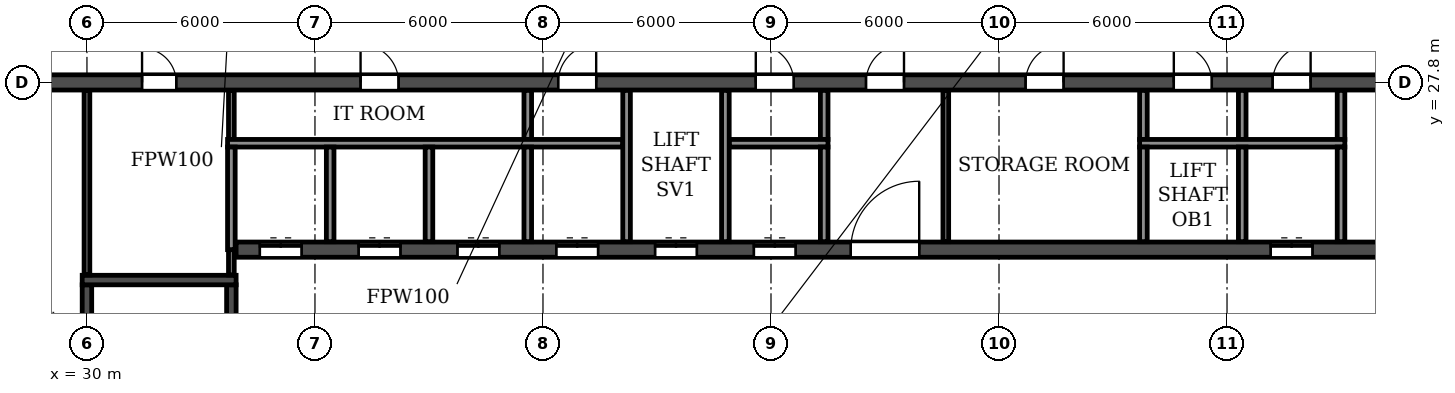
"""IFC4 building model, lengths in metres.
Left out: names, types, materials, properties, quantities, classifications, styles, units other than length and angle.
Written with IfcOpenShell. Run it as: python <this file> out.ifc"""

import sys

from ifc_helpers import new_model, si_unit, direction, frame, frame_2d, origin, place, context, subcontext, project, spatial, rectangle, extrude, element, fill, save


model = new_model("IFC4")
c1 = context("Model", 3, precision=1e-05, world=origin(), true_north=direction((0.0, 1.0)))
c2 = subcontext(c1, "Body", "Model", "MODEL_VIEW")
j1 = project(units=[si_unit("LENGTHUNIT", "METRE"), si_unit("PLANEANGLEUNIT", "RADIAN")], contexts=[c1])
p1 = place(None, origin())
s1 = spatial("IfcSite", under=j1, at=p1, CompositionType="ELEMENT")
p2 = place(p1, origin())
s2 = spatial("IfcBuilding", under=s1, at=p2, CompositionType="ELEMENT")
p3 = place(p2, frame((0.0, 0.0, 181.8)))
s3 = spatial("IfcBuildingStorey", under=s2, at=p3, CompositionType="ELEMENT", Elevation=181.8)
p4 = place(p3, frame((18.2, 27.8, 0.0), z_axis=(0.0, 0.0, 1.0), x_axis=(1.0, 0.0, 0.0)))
e1 = element("IfcWall", 1, at=p4, inside=s3, PredefinedType="SOLIDWALL", context=c2, shape_type="SweptSolid", body=[
    extrude(rectangle(XDim=65.6, YDim=0.4, at=frame_2d((32.8, 0.0))), origin(), (0.0, 0.0, 1.0), 3.08),
])
p5 = place(p4, frame((0.7, 0.0, 0.0)))
e2 = element("IfcOpeningElement", 2, at=p5, cuts=e1, PredefinedType="OPENING", context=c2, shape_type="SweptSolid", body=[
    extrude(rectangle(XDim=1.0, YDim=2.1, at=frame_2d((0.5, 1.05))), frame((0.0, 0.21, 0.0), z_axis=(0.0, -1.0, 0.0), x_axis=(1.0, 0.0, 0.0)), (0.0, 0.0, 1.0), 0.42),
])
p6 = place(p4, frame((4.05, 0.0, 0.0)))
e3 = element("IfcOpeningElement", 3, at=p6, cuts=e1, PredefinedType="OPENING", context=c2, shape_type="SweptSolid", body=[
    extrude(rectangle(XDim=0.9, YDim=2.1, at=frame_2d((0.45, 1.05))), frame((0.0, 0.21, 0.0), z_axis=(0.0, -1.0, 0.0), x_axis=(1.0, 0.0, 0.0)), (0.0, 0.0, 1.0), 0.42),
])
p7 = place(p4, frame((13.25, 0.0, 0.0)))
e4 = element("IfcOpeningElement", 4, at=p7, cuts=e1, PredefinedType="OPENING", context=c2, shape_type="SweptSolid", body=[
    extrude(rectangle(XDim=0.9, YDim=2.1, at=frame_2d((0.45, 1.05))), frame((0.0, 0.21, 0.0), z_axis=(0.0, -1.0, 0.0), x_axis=(1.0, 0.0, 0.0)), (0.0, 0.0, 1.0), 0.42),
])
p8 = place(p4, frame((19.0, 0.0, 0.0)))
e5 = element("IfcOpeningElement", 5, at=p8, cuts=e1, PredefinedType="OPENING", context=c2, shape_type="SweptSolid", body=[
    extrude(rectangle(XDim=1.0, YDim=2.1, at=frame_2d((0.5, 1.05))), frame((0.0, 0.21, 0.0), z_axis=(0.0, -1.0, 0.0), x_axis=(1.0, 0.0, 0.0)), (0.0, 0.0, 1.0), 0.42),
])
p9 = place(p4, frame((24.2, 0.0, 0.0)))
e6 = element("IfcOpeningElement", 6, at=p9, cuts=e1, PredefinedType="OPENING", context=c2, shape_type="SweptSolid", body=[
    extrude(rectangle(XDim=1.0, YDim=2.1, at=frame_2d((0.5, 1.05))), frame((0.0, 0.21, 0.0), z_axis=(0.0, -1.0, 0.0), x_axis=(1.0, 0.0, 0.0)), (0.0, 0.0, 1.0), 0.42),
])
p10 = place(p4, frame((29.4, 0.0, 0.0)))
e7 = element("IfcOpeningElement", 7, at=p10, cuts=e1, PredefinedType="OPENING", context=c2, shape_type="SweptSolid", body=[
    extrude(rectangle(XDim=1.0, YDim=2.1, at=frame_2d((0.5, 1.05))), frame((0.0, 0.21, 0.0), z_axis=(0.0, -1.0, 0.0), x_axis=(1.0, 0.0, 0.0)), (0.0, 0.0, 1.0), 0.42),
])
p11 = place(p4, frame((32.3, 0.0, 0.0)))
e8 = element("IfcOpeningElement", 8, at=p11, cuts=e1, PredefinedType="OPENING", context=c2, shape_type="SweptSolid", body=[
    extrude(rectangle(XDim=1.0, YDim=2.1, at=frame_2d((0.5, 1.05))), frame((0.0, 0.21, 0.0), z_axis=(0.0, -1.0, 0.0), x_axis=(1.0, 0.0, 0.0)), (0.0, 0.0, 1.0), 0.42),
])
p12 = place(p4, frame((36.5, 0.0, 0.0)))
e9 = element("IfcOpeningElement", 9, at=p12, cuts=e1, PredefinedType="OPENING", context=c2, shape_type="SweptSolid", body=[
    extrude(rectangle(XDim=1.0, YDim=2.1, at=frame_2d((0.5, 1.05))), frame((0.0, 0.21, 0.0), z_axis=(0.0, -1.0, 0.0), x_axis=(1.0, 0.0, 0.0)), (0.0, 0.0, 1.0), 0.42),
])
p13 = place(p4, frame((40.4, 0.0, 0.0)))
e10 = element("IfcOpeningElement", 10, at=p13, cuts=e1, PredefinedType="OPENING", context=c2, shape_type="SweptSolid", body=[
    extrude(rectangle(XDim=1.0, YDim=2.1, at=frame_2d((0.5, 1.05))), frame((0.0, 0.21, 0.0), z_axis=(0.0, -1.0, 0.0), x_axis=(1.0, 0.0, 0.0)), (0.0, 0.0, 1.0), 0.42),
])
p14 = place(p4, frame((43.0, 0.0, 0.0)))
e11 = element("IfcOpeningElement", 11, at=p14, cuts=e1, PredefinedType="OPENING", context=c2, shape_type="SweptSolid", body=[
    extrude(rectangle(XDim=1.0, YDim=2.1, at=frame_2d((0.5, 1.05))), frame((0.0, 0.21, 0.0), z_axis=(0.0, -1.0, 0.0), x_axis=(1.0, 0.0, 0.0)), (0.0, 0.0, 1.0), 0.42),
])
p15 = place(p4, frame((46.65, 0.0, 0.0)))
e12 = element("IfcOpeningElement", 12, at=p15, cuts=e1, PredefinedType="OPENING", context=c2, shape_type="SweptSolid", body=[
    extrude(rectangle(XDim=1.5, YDim=2.1, at=frame_2d((0.75, 1.05))), frame((0.0, 0.21, 0.0), z_axis=(0.0, -1.0, 0.0), x_axis=(1.0, 0.0, 0.0)), (0.0, 0.0, 1.0), 0.42),
])
p16 = place(p4, frame((51.45, 0.0, 0.0)))
e13 = element("IfcOpeningElement", 13, at=p16, cuts=e1, PredefinedType="OPENING", context=c2, shape_type="SweptSolid", body=[
    extrude(rectangle(XDim=0.9, YDim=2.1, at=frame_2d((0.45, 1.05))), frame((0.0, 0.21, 0.0), z_axis=(0.0, -1.0, 0.0), x_axis=(1.0, 0.0, 0.0)), (0.0, 0.0, 1.0), 0.42),
])
p17 = place(p4, frame((60.65, 0.0, 0.0)))
e14 = element("IfcOpeningElement", 14, at=p17, cuts=e1, PredefinedType="OPENING", context=c2, shape_type="SweptSolid", body=[
    extrude(rectangle(XDim=0.9, YDim=2.1, at=frame_2d((0.45, 1.05))), frame((0.0, 0.21, 0.0), z_axis=(0.0, -1.0, 0.0), x_axis=(1.0, 0.0, 0.0)), (0.0, 0.0, 1.0), 0.42),
])
p18 = place(p4, frame((63.9, 0.0, 0.0)))
e15 = element("IfcOpeningElement", 15, at=p18, cuts=e1, PredefinedType="OPENING", context=c2, shape_type="SweptSolid", body=[
    extrude(rectangle(XDim=1.0, YDim=2.1, at=frame_2d((0.5, 1.05))), frame((0.0, 0.21, 0.0), z_axis=(0.0, -1.0, 0.0), x_axis=(1.0, 0.0, 0.0)), (0.0, 0.0, 1.0), 0.42),
])
p19 = place(p3, frame((33.925, 23.4, 0.0), z_axis=(0.0, 0.0, 1.0), x_axis=(1.0, 0.0, 0.0)))
e16 = element("IfcWall", 16, at=p19, inside=s3, PredefinedType="SOLIDWALL", context=c2, shape_type="SweptSolid", body=[
    extrude(rectangle(XDim=34.15, YDim=0.4, at=frame_2d((17.075, 0.0))), origin(), (0.0, 0.0, 1.0), 3.08),
])
p20 = place(p19, frame((16.175, 0.0, 0.0)))
e17 = element("IfcOpeningElement", 17, at=p20, cuts=e16, PredefinedType="OPENING", context=c2, shape_type="SweptSolid", body=[
    extrude(rectangle(XDim=1.8, YDim=2.1, at=frame_2d((0.9, 1.05))), frame((0.0, 0.21, 0.0), z_axis=(0.0, -1.0, 0.0), x_axis=(1.0, 0.0, 0.0)), (0.0, 0.0, 1.0), 0.42),
])
p21 = place(p19, frame((0.625, 0.0, 0.0)))
e18 = element("IfcOpeningElement", 18, at=p21, cuts=e16, PredefinedType="OPENING", context=c2, shape_type="SweptSolid", body=[
    extrude(rectangle(XDim=1.1, YDim=2.1, at=frame_2d((0.55, 1.05))), frame((0.0, 0.21, 0.0), z_axis=(0.0, -1.0, 0.0), x_axis=(1.0, 0.0, 0.0)), (0.0, 0.0, 1.0), 0.42),
])
p22 = place(p19, frame((3.225, 0.0, 0.0)))
e19 = element("IfcOpeningElement", 19, at=p22, cuts=e16, PredefinedType="OPENING", context=c2, shape_type="SweptSolid", body=[
    extrude(rectangle(XDim=1.1, YDim=2.1, at=frame_2d((0.55, 1.05))), frame((0.0, 0.21, 0.0), z_axis=(0.0, -1.0, 0.0), x_axis=(1.0, 0.0, 0.0)), (0.0, 0.0, 1.0), 0.42),
])
p23 = place(p19, frame((5.825, 0.0, 0.0)))
e20 = element("IfcOpeningElement", 20, at=p23, cuts=e16, PredefinedType="OPENING", context=c2, shape_type="SweptSolid", body=[
    extrude(rectangle(XDim=1.1, YDim=2.1, at=frame_2d((0.55, 1.05))), frame((0.0, 0.21, 0.0), z_axis=(0.0, -1.0, 0.0), x_axis=(1.0, 0.0, 0.0)), (0.0, 0.0, 1.0), 0.42),
])
p24 = place(p19, frame((8.425, 0.0, 0.0)))
e21 = element("IfcOpeningElement", 21, at=p24, cuts=e16, PredefinedType="OPENING", context=c2, shape_type="SweptSolid", body=[
    extrude(rectangle(XDim=1.1, YDim=2.1, at=frame_2d((0.55, 1.05))), frame((0.0, 0.21, 0.0), z_axis=(0.0, -1.0, 0.0), x_axis=(1.0, 0.0, 0.0)), (0.0, 0.0, 1.0), 0.42),
])
p25 = place(p19, frame((11.025, 0.0, 0.0)))
e22 = element("IfcOpeningElement", 22, at=p25, cuts=e16, PredefinedType="OPENING", context=c2, shape_type="SweptSolid", body=[
    extrude(rectangle(XDim=1.1, YDim=2.1, at=frame_2d((0.55, 1.05))), frame((0.0, 0.21, 0.0), z_axis=(0.0, -1.0, 0.0), x_axis=(1.0, 0.0, 0.0)), (0.0, 0.0, 1.0), 0.42),
])
p26 = place(p19, frame((13.625, 0.0, 0.0)))
e23 = element("IfcOpeningElement", 23, at=p26, cuts=e16, PredefinedType="OPENING", context=c2, shape_type="SweptSolid", body=[
    extrude(rectangle(XDim=1.1, YDim=2.1, at=frame_2d((0.55, 1.05))), frame((0.0, 0.21, 0.0), z_axis=(0.0, -1.0, 0.0), x_axis=(1.0, 0.0, 0.0)), (0.0, 0.0, 1.0), 0.42),
])
p27 = place(p19, frame((27.225, 0.0, 0.0)))
e24 = element("IfcOpeningElement", 24, at=p27, cuts=e16, PredefinedType="OPENING", context=c2, shape_type="SweptSolid", body=[
    extrude(rectangle(XDim=1.1, YDim=2.1, at=frame_2d((0.55, 1.05))), frame((0.0, 0.21, 0.0), z_axis=(0.0, -1.0, 0.0), x_axis=(1.0, 0.0, 0.0)), (0.0, 0.0, 1.0), 0.42),
])
p28 = place(p3, frame((30.0, 14.8, 0.0), z_axis=(0.0, 0.0, 1.0), x_axis=(0.0, 1.0, 0.0)))
e25 = element("IfcWall", 25, at=p28, inside=s3, PredefinedType="SOLIDWALL", context=c2, shape_type="SweptSolid", body=[
    extrude(rectangle(XDim=7.675, YDim=0.25, at=frame_2d((3.837, 0.0))), origin(), (0.0, 0.0, 1.0), 3.08),
])
p29 = place(p3, frame((33.8, 14.8, 0.0), z_axis=(0.0, 0.0, 1.0), x_axis=(0.0, 1.0, 0.0)))
e26 = element("IfcWall", 26, at=p29, inside=s3, PredefinedType="SOLIDWALL", context=c2, shape_type="SweptSolid", body=[
    extrude(rectangle(XDim=7.675, YDim=0.25, at=frame_2d((3.837, 0.0))), origin(), (0.0, 0.0, 1.0), 3.08),
])
p30 = place(p29, frame((0.5, 0.0, 0.0)))
e27 = element("IfcOpeningElement", 27, at=p30, cuts=e26, PredefinedType="OPENING", context=c2, shape_type="SweptSolid", body=[
    extrude(rectangle(XDim=1.0, YDim=2.1, at=frame_2d((0.5, 1.05))), frame((0.0, 0.135, 0.0), z_axis=(0.0, -1.0, 0.0), x_axis=(1.0, 0.0, 0.0)), (0.0, 0.0, 1.0), 0.27),
])
p31 = place(p3, frame((29.875, 22.6, 0.0), z_axis=(0.0, 0.0, 1.0), x_axis=(1.0, 0.0, 0.0)))
e28 = element("IfcWall", 28, at=p31, inside=s3, PredefinedType="SOLIDWALL", context=c2, shape_type="SweptSolid", body=[
    extrude(rectangle(XDim=4.05, YDim=0.25, at=frame_2d((2.025, 0.0))), origin(), (0.0, 0.0, 1.0), 3.08),
])
p32 = place(p3, frame((52.6, 23.61, 0.0), z_axis=(0.0, 0.0, 1.0), x_axis=(0.0, 1.0, 0.0)))
e29 = element("IfcWall", 29, at=p32, inside=s3, PredefinedType="PARTITIONING", context=c2, shape_type="SweptSolid", body=[
    extrude(rectangle(XDim=3.98, YDim=0.15, at=frame_2d((1.99, 0.0))), origin(), (0.0, 0.0, 1.0), 3.08),
])
for number, where, z_axis, x_axis in (
    (30, (41.6, 26.3, 0.0), (0.0, 0.0, 1.0), (0.0, 1.0, 0.0)),
    (31, (49.4, 26.3, 0.0), (0.0, 0.0, 1.0), (0.0, 1.0, 0.0)),
    (32, (57.8, 26.3, 0.0), (0.0, 0.0, 1.0), (0.0, 1.0, 0.0)),
    (33, (60.4, 26.3, 0.0), (0.0, 0.0, 1.0), (0.0, 1.0, 0.0)),
    (34, (63.0, 26.3, 0.0), (0.0, 0.0, 1.0), (0.0, 1.0, 0.0)),
):
    element("IfcWall", number, at=place(p3, frame(where, z_axis=z_axis, x_axis=x_axis)), inside=s3, PredefinedType="PARTITIONING", context=c2, shape_type="SweptSolid", body=[
        extrude(rectangle(XDim=1.29, YDim=0.2, at=frame_2d((0.645, 0.0))), origin(), (0.0, 0.0, 1.0), 3.08),
    ])
p33 = place(p3, frame((30.0, 22.735, 0.0), z_axis=(0.0, 0.0, 1.0), x_axis=(0.0, 1.0, 0.0)))
e35 = element("IfcWall", 35, at=p33, inside=s3, PredefinedType="PARTITIONING", context=c2, shape_type="SweptSolid", body=[
    extrude(rectangle(XDim=4.855, YDim=0.15, at=frame_2d((2.427, 0.0))), origin(), (0.0, 0.0, 1.0), 3.08),
])
p34 = place(p3, frame((33.8, 22.735, 0.0), z_axis=(0.0, 0.0, 1.0), x_axis=(0.0, 1.0, 0.0)))
e36 = element("IfcWall", 36, at=p34, inside=s3, PredefinedType="PARTITIONING", context=c2, shape_type="SweptSolid", body=[
    extrude(rectangle(XDim=0.665, YDim=0.15, at=frame_2d((0.333, 0.0))), origin(), (0.0, 0.0, 1.0), 3.08),
])
p35 = place(p3, frame((33.8, 26.3, 0.0), z_axis=(0.0, 0.0, 1.0), x_axis=(0.0, 1.0, 0.0)))
e37 = element("IfcWall", 37, at=p35, inside=s3, PredefinedType="PARTITIONING", context=c2, shape_type="SweptSolid", body=[
    extrude(rectangle(XDim=1.29, YDim=0.15, at=frame_2d((0.645, 0.0))), origin(), (0.0, 0.0, 1.0), 3.08),
])
p36 = place(p3, frame((33.7, 26.2, 0.0), z_axis=(0.0, 0.0, 1.0), x_axis=(1.0, 0.0, 0.0)))
e38 = element("IfcWall", 38, at=p36, inside=s3, PredefinedType="PARTITIONING", context=c2, shape_type="SweptSolid", body=[
    extrude(rectangle(XDim=10.4, YDim=0.2, at=frame_2d((5.2, 0.0))), origin(), (0.0, 0.0, 1.0), 3.08),
])
p37 = place(p3, frame((46.9, 26.2, 0.0), z_axis=(0.0, 0.0, 1.0), x_axis=(1.0, 0.0, 0.0)))
e39 = element("IfcWall", 39, at=p37, inside=s3, PredefinedType="PARTITIONING", context=c2, shape_type="SweptSolid", body=[
    extrude(rectangle(XDim=2.6, YDim=0.2, at=frame_2d((1.3, 0.0))), origin(), (0.0, 0.0, 1.0), 3.08),
])
p38 = place(p3, frame((57.7, 26.2, 0.0), z_axis=(0.0, 0.0, 1.0), x_axis=(1.0, 0.0, 0.0)))
e40 = element("IfcWall", 40, at=p38, inside=s3, PredefinedType="PARTITIONING", context=c2, shape_type="SweptSolid", body=[
    extrude(rectangle(XDim=5.4, YDim=0.2, at=frame_2d((2.7, 0.0))), origin(), (0.0, 0.0, 1.0), 3.08),
])
p39 = place(p3, frame((33.8, 23.4, 0.0), z_axis=(0.0, 0.0, 1.0), x_axis=(0.0, 1.0, 0.0)))
e41 = element("IfcWall", 41, at=p39, inside=s3, PredefinedType="PARTITIONING", context=c2, shape_type="SweptSolid", body=[
    extrude(rectangle(XDim=2.7, YDim=0.2, at=frame_2d((1.35, 0.0))), origin(), (0.0, 0.0, 1.0), 3.08),
])
for number, where, z_axis, x_axis in (
    (42, (36.4, 23.61, 0.0), (0.0, 0.0, 1.0), (0.0, 1.0, 0.0)),
    (43, (39.0, 23.61, 0.0), (0.0, 0.0, 1.0), (0.0, 1.0, 0.0)),
    (44, (41.6, 23.61, 0.0), (0.0, 0.0, 1.0), (0.0, 1.0, 0.0)),
):
    element("IfcWall", number, at=place(p3, frame(where, z_axis=z_axis, x_axis=x_axis)), inside=s3, PredefinedType="PARTITIONING", context=c2, shape_type="SweptSolid", body=[
        extrude(rectangle(XDim=2.49, YDim=0.2, at=frame_2d((1.245, 0.0))), origin(), (0.0, 0.0, 1.0), 3.08),
    ])
for number, where, z_axis, x_axis in (
    (45, (44.2, 23.61, 0.0), (0.0, 0.0, 1.0), (0.0, 1.0, 0.0)),
    (46, (46.8, 23.61, 0.0), (0.0, 0.0, 1.0), (0.0, 1.0, 0.0)),
):
    element("IfcWall", number, at=place(p3, frame(where, z_axis=z_axis, x_axis=x_axis)), inside=s3, PredefinedType="PARTITIONING", context=c2, shape_type="SweptSolid", body=[
        extrude(rectangle(XDim=3.98, YDim=0.2, at=frame_2d((1.99, 0.0))), origin(), (0.0, 0.0, 1.0), 3.08),
    ])
for number, where, z_axis, x_axis in (
    (47, (49.4, 23.61, 0.0), (0.0, 0.0, 1.0), (0.0, 1.0, 0.0)),
    (48, (57.8, 23.61, 0.0), (0.0, 0.0, 1.0), (0.0, 1.0, 0.0)),
    (49, (60.4, 23.61, 0.0), (0.0, 0.0, 1.0), (0.0, 1.0, 0.0)),
    (50, (63.0, 23.61, 0.0), (0.0, 0.0, 1.0), (0.0, 1.0, 0.0)),
):
    element("IfcWall", number, at=place(p3, frame(where, z_axis=z_axis, x_axis=x_axis)), inside=s3, PredefinedType="PARTITIONING", context=c2, shape_type="SweptSolid", body=[
        extrude(rectangle(XDim=2.49, YDim=0.2, at=frame_2d((1.245, 0.0))), origin(), (0.0, 0.0, 1.0), 3.08),
    ])
p40 = place(p7, origin())
e51 = element("IfcDoor", 51, at=p40, inside=s3, OperationType="SINGLE_SWING_LEFT", PredefinedType="DOOR", context=c2, shape_type="SweptSolid", body=[
    extrude(rectangle(XDim=0.9, YDim=2.1, at=frame_2d((0.45, 1.05))), frame((0.0, 0.025, 0.0), z_axis=(0.0, -1.0, 0.0), x_axis=(1.0, 0.0, 0.0)), (0.0, 0.0, 1.0), 0.05),
])
fill(e4, e51)
p41 = place(p8, origin())
e52 = element("IfcDoor", 52, at=p41, inside=s3, OperationType="SINGLE_SWING_LEFT", PredefinedType="DOOR", context=c2, shape_type="SweptSolid", body=[
    extrude(rectangle(XDim=1.0, YDim=2.1, at=frame_2d((0.5, 1.05))), frame((0.0, 0.025, 0.0), z_axis=(0.0, -1.0, 0.0), x_axis=(1.0, 0.0, 0.0)), (0.0, 0.0, 1.0), 0.05),
])
fill(e5, e52)
p42 = place(p9, origin())
e53 = element("IfcDoor", 53, at=p42, inside=s3, OperationType="SINGLE_SWING_RIGHT", PredefinedType="DOOR", context=c2, shape_type="SweptSolid", body=[
    extrude(rectangle(XDim=1.0, YDim=2.1, at=frame_2d((0.5, 1.05))), frame((0.0, 0.025, 0.0), z_axis=(0.0, -1.0, 0.0), x_axis=(1.0, 0.0, 0.0)), (0.0, 0.0, 1.0), 0.05),
])
fill(e6, e53)
p43 = place(p10, origin())
e54 = element("IfcDoor", 54, at=p43, inside=s3, OperationType="SINGLE_SWING_LEFT", PredefinedType="DOOR", context=c2, shape_type="SweptSolid", body=[
    extrude(rectangle(XDim=1.0, YDim=2.1, at=frame_2d((0.5, 1.05))), frame((0.0, 0.025, 0.0), z_axis=(0.0, -1.0, 0.0), x_axis=(1.0, 0.0, 0.0)), (0.0, 0.0, 1.0), 0.05),
])
fill(e7, e54)
p44 = place(p11, origin())
e55 = element("IfcDoor", 55, at=p44, inside=s3, OperationType="SINGLE_SWING_RIGHT", PredefinedType="DOOR", context=c2, shape_type="SweptSolid", body=[
    extrude(rectangle(XDim=1.0, YDim=2.1, at=frame_2d((0.5, 1.05))), frame((0.0, 0.025, 0.0), z_axis=(0.0, -1.0, 0.0), x_axis=(1.0, 0.0, 0.0)), (0.0, 0.0, 1.0), 0.05),
])
fill(e8, e55)
p45 = place(p12, origin())
e56 = element("IfcDoor", 56, at=p45, inside=s3, OperationType="SINGLE_SWING_RIGHT", PredefinedType="DOOR", context=c2, shape_type="SweptSolid", body=[
    extrude(rectangle(XDim=1.0, YDim=2.1, at=frame_2d((0.5, 1.05))), frame((0.0, 0.025, 0.0), z_axis=(0.0, -1.0, 0.0), x_axis=(1.0, 0.0, 0.0)), (0.0, 0.0, 1.0), 0.05),
])
fill(e9, e56)
p46 = place(p13, origin())
e57 = element("IfcDoor", 57, at=p46, inside=s3, OperationType="SINGLE_SWING_LEFT", PredefinedType="DOOR", context=c2, shape_type="SweptSolid", body=[
    extrude(rectangle(XDim=1.0, YDim=2.1, at=frame_2d((0.5, 1.05))), frame((0.0, 0.025, 0.0), z_axis=(0.0, -1.0, 0.0), x_axis=(1.0, 0.0, 0.0)), (0.0, 0.0, 1.0), 0.05),
])
fill(e10, e57)
p47 = place(p14, origin())
e58 = element("IfcDoor", 58, at=p47, inside=s3, OperationType="SINGLE_SWING_RIGHT", PredefinedType="DOOR", context=c2, shape_type="SweptSolid", body=[
    extrude(rectangle(XDim=1.0, YDim=2.1, at=frame_2d((0.5, 1.05))), frame((0.0, 0.025, 0.0), z_axis=(0.0, -1.0, 0.0), x_axis=(1.0, 0.0, 0.0)), (0.0, 0.0, 1.0), 0.05),
])
fill(e11, e58)
p48 = place(p20, origin())
e59 = element("IfcDoor", 59, at=p48, inside=s3, OperationType="DOUBLE_DOOR_SINGLE_SWING", PredefinedType="DOOR", context=c2, shape_type="SweptSolid", body=[
    extrude(rectangle(XDim=1.8, YDim=2.1, at=frame_2d((0.9, 1.05))), frame((0.0, 0.025, 0.0), z_axis=(0.0, -1.0, 0.0), x_axis=(1.0, 0.0, 0.0)), (0.0, 0.0, 1.0), 0.05),
])
fill(e17, e59)
p49 = place(p21, origin())
e60 = element("IfcDoor", 60, at=p49, inside=s3, OperationType="DOUBLE_DOOR_SLIDING", PredefinedType="DOOR", context=c2, shape_type="SweptSolid", body=[
    extrude(rectangle(XDim=1.1, YDim=2.1, at=frame_2d((0.55, 1.05))), frame((0.0, 0.025, 0.0), z_axis=(0.0, -1.0, 0.0), x_axis=(1.0, 0.0, 0.0)), (0.0, 0.0, 1.0), 0.05),
])
fill(e18, e60)
p50 = place(p22, origin())
e61 = element("IfcDoor", 61, at=p50, inside=s3, OperationType="DOUBLE_DOOR_SLIDING", PredefinedType="DOOR", context=c2, shape_type="SweptSolid", body=[
    extrude(rectangle(XDim=1.1, YDim=2.1, at=frame_2d((0.55, 1.05))), frame((0.0, 0.025, 0.0), z_axis=(0.0, -1.0, 0.0), x_axis=(1.0, 0.0, 0.0)), (0.0, 0.0, 1.0), 0.05),
])
fill(e19, e61)
p51 = place(p23, origin())
e62 = element("IfcDoor", 62, at=p51, inside=s3, OperationType="DOUBLE_DOOR_SLIDING", PredefinedType="DOOR", context=c2, shape_type="SweptSolid", body=[
    extrude(rectangle(XDim=1.1, YDim=2.1, at=frame_2d((0.55, 1.05))), frame((0.0, 0.025, 0.0), z_axis=(0.0, -1.0, 0.0), x_axis=(1.0, 0.0, 0.0)), (0.0, 0.0, 1.0), 0.05),
])
fill(e20, e62)
p52 = place(p24, origin())
e63 = element("IfcDoor", 63, at=p52, inside=s3, OperationType="DOUBLE_DOOR_SLIDING", PredefinedType="DOOR", context=c2, shape_type="SweptSolid", body=[
    extrude(rectangle(XDim=1.1, YDim=2.1, at=frame_2d((0.55, 1.05))), frame((0.0, 0.025, 0.0), z_axis=(0.0, -1.0, 0.0), x_axis=(1.0, 0.0, 0.0)), (0.0, 0.0, 1.0), 0.05),
])
fill(e21, e63)
p53 = place(p25, origin())
e64 = element("IfcDoor", 64, at=p53, inside=s3, OperationType="DOUBLE_DOOR_SLIDING", PredefinedType="DOOR", context=c2, shape_type="SweptSolid", body=[
    extrude(rectangle(XDim=1.1, YDim=2.1, at=frame_2d((0.55, 1.05))), frame((0.0, 0.025, 0.0), z_axis=(0.0, -1.0, 0.0), x_axis=(1.0, 0.0, 0.0)), (0.0, 0.0, 1.0), 0.05),
])
fill(e22, e64)
p54 = place(p26, origin())
e65 = element("IfcDoor", 65, at=p54, inside=s3, OperationType="DOUBLE_DOOR_SLIDING", PredefinedType="DOOR", context=c2, shape_type="SweptSolid", body=[
    extrude(rectangle(XDim=1.1, YDim=2.1, at=frame_2d((0.55, 1.05))), frame((0.0, 0.025, 0.0), z_axis=(0.0, -1.0, 0.0), x_axis=(1.0, 0.0, 0.0)), (0.0, 0.0, 1.0), 0.05),
])
fill(e23, e65)
p55 = place(p27, origin())
e66 = element("IfcDoor", 66, at=p55, inside=s3, OperationType="DOUBLE_DOOR_SLIDING", PredefinedType="DOOR", context=c2, shape_type="SweptSolid", body=[
    extrude(rectangle(XDim=1.1, YDim=2.1, at=frame_2d((0.55, 1.05))), frame((0.0, 0.025, 0.0), z_axis=(0.0, -1.0, 0.0), x_axis=(1.0, 0.0, 0.0)), (0.0, 0.0, 1.0), 0.05),
])
fill(e24, e66)
save(model, sys.argv[1])
